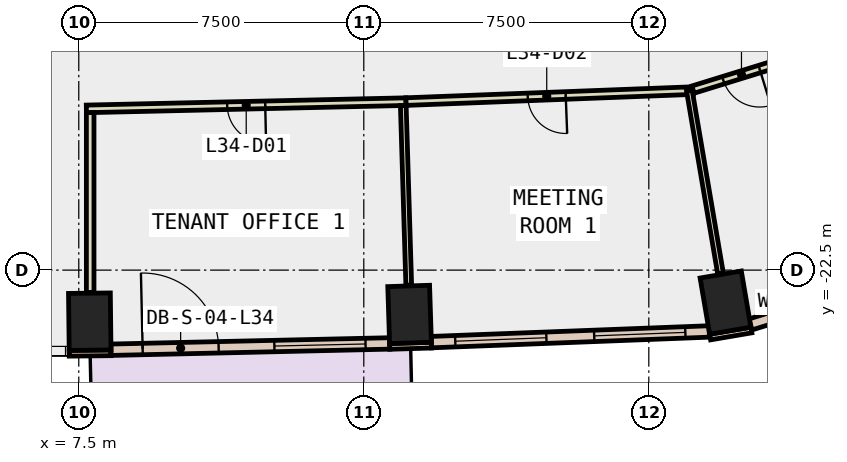
"""IFC4 building model, lengths in metres.
Left out: names, types, materials, properties, quantities, classifications, styles, units other than length and angle.
Written with IfcOpenShell. Run it as: python <this file> out.ifc"""

import sys

from ifc_helpers import new_model, si_unit, direction, frame, frame_2d, origin, origin_2d, place, context, subcontext, project, spatial, rectangle, extrude, element, fill, save


model = new_model("IFC4")
c1 = context("Model", 3, precision=1e-05, world=origin(), true_north=direction((0.0, 1.0)))
c2 = subcontext(c1, "Body", "Model", "MODEL_VIEW")
j1 = project(units=[si_unit("LENGTHUNIT", "METRE"), si_unit("PLANEANGLEUNIT", "RADIAN")], contexts=[c1])
p1 = place(None, origin())
s1 = spatial("IfcSite", under=j1, at=p1, CompositionType="ELEMENT")
p2 = place(p1, origin())
s2 = spatial("IfcBuilding", under=s1, at=p2, CompositionType="ELEMENT")
p3 = place(p2, frame((0.0, 0.0, 155.0)))
s3 = spatial("IfcBuildingStorey", under=s2, at=p3, CompositionType="ELEMENT", Elevation=155.0)
for number, where, z_axis, x_axis in (
    (1, (7.789, -23.857, -0.4), (0.0, 0.0, 1.0), (1.0, 0.012, 0.0)),
    (2, (16.205, -23.666, -0.4), (0.0, 0.0, 1.0), (0.999, 0.032, 0.0)),
    (3, (24.518, -23.355, -0.4), (0.0, 0.0, 1.0), (0.986, 0.168, 0.0)),
):
    element("IfcColumn", number, at=place(p3, frame(where, z_axis=z_axis, x_axis=x_axis)), inside=s3, PredefinedType="COLUMN", context=c2, shape_type="SweptSolid", body=[
        extrude(rectangle(XDim=1.1, YDim=1.5, at=origin_2d()), origin(), (0.0, 0.0, 1.0), 4.2),
    ])
p4 = place(p3, frame((7.249, -24.688, 0.0), z_axis=(0.0, 0.0, 1.0), x_axis=(0.999940879068, 0.010873746799, 0.0)))
e4 = element("IfcWall", 4, at=p4, inside=s3, PredefinedType="STANDARD", context=c2, shape_type="SweptSolid", body=[
    extrude(rectangle(XDim=1.1, YDim=0.15, at=frame_2d((0.55, 0.0))), origin(), (0.0, 0.0, 1.0), 3.8),
])
p5 = place(p3, frame((15.682, -24.508, 0.0), z_axis=(0.0, 0.0, 1.0), x_axis=(0.999523702549, 0.030860460829, 0.0)))
e5 = element("IfcWall", 5, at=p5, inside=s3, PredefinedType="STANDARD", context=c2, shape_type="SweptSolid", body=[
    extrude(rectangle(XDim=1.1, YDim=0.15, at=frame_2d((0.55, 0.0))), origin(), (0.0, 0.0, 1.0), 3.8),
])
p6 = place(p3, frame((24.114, -24.261, 0.0), z_axis=(0.0, 0.0, 1.0), x_axis=(0.985763338892, 0.168138751323, 0.0)))
e6 = element("IfcWall", 6, at=p6, inside=s3, PredefinedType="STANDARD", context=c2, shape_type="SweptSolid", body=[
    extrude(rectangle(XDim=1.101, YDim=0.15, at=frame_2d((0.55, 0.0))), origin(), (0.0, 0.0, 1.0), 3.8),
])
p7 = place(p3, frame((8.347, -24.595, 0.0), z_axis=(0.0, 0.0, 1.0), x_axis=(0.999743825009, 0.022633699594, 0.0)))
e7 = element("IfcWall", 7, at=p7, inside=s3, PredefinedType="STANDARD", context=c2, shape_type="SweptSolid", body=[
    extrude(rectangle(XDim=7.335, YDim=0.3, at=frame_2d((3.667, 0.0))), origin(), (0.0, 0.0, 1.0), 3.8),
])
p8 = place(p7, frame((0.834, 0.0, 0.0)))
e8 = element("IfcOpeningElement", 8, at=p8, cuts=e7, PredefinedType="OPENING", context=c2, shape_type="SweptSolid", body=[
    extrude(rectangle(XDim=2.0, YDim=2.4, at=frame_2d((1.0, 1.2))), frame((0.0, 0.16, 0.0), z_axis=(0.0, -1.0, 0.0), x_axis=(1.0, 0.0, 0.0)), (0.0, 0.0, 1.0), 0.32),
])
p9 = place(p7, frame((4.301, 0.0, 0.9)))
e9 = element("IfcOpeningElement", 9, at=p9, cuts=e7, PredefinedType="OPENING", context=c2, shape_type="SweptSolid", body=[
    extrude(rectangle(XDim=2.4, YDim=2.6, at=frame_2d((1.2, 1.3))), frame((0.0, 0.16, 0.0), z_axis=(0.0, -1.0, 0.0), x_axis=(1.0, 0.0, 0.0)), (0.0, 0.0, 1.0), 0.32),
])
p10 = place(p3, frame((16.778, -24.395, 0.0), z_axis=(0.0, 0.0, 1.0), x_axis=(0.999262356942, 0.038402369711, 0.0)))
e10 = element("IfcWall", 10, at=p10, inside=s3, PredefinedType="STANDARD", context=c2, shape_type="SweptSolid", body=[
    extrude(rectangle(XDim=7.317, YDim=0.3, at=frame_2d((3.659, 0.0))), origin(), (0.0, 0.0, 1.0), 3.8),
])
p11 = place(p10, frame((0.629, 0.0, 0.9)))
e11 = element("IfcOpeningElement", 11, at=p11, cuts=e10, PredefinedType="OPENING", context=c2, shape_type="SweptSolid", body=[
    extrude(rectangle(XDim=2.4, YDim=2.6, at=frame_2d((1.2, 1.3))), frame((0.0, 0.16, 0.0), z_axis=(0.0, -1.0, 0.0), x_axis=(1.0, 0.0, 0.0)), (0.0, 0.0, 1.0), 0.32),
])
p12 = place(p10, frame((4.288, 0.0, 0.9)))
e12 = element("IfcOpeningElement", 12, at=p12, cuts=e10, PredefinedType="OPENING", context=c2, shape_type="SweptSolid", body=[
    extrude(rectangle(XDim=2.4, YDim=2.6, at=frame_2d((1.2, 1.3))), frame((0.0, 0.16, 0.0), z_axis=(0.0, -1.0, 0.0), x_axis=(1.0, 0.0, 0.0)), (0.0, 0.0, 1.0), 0.32),
])
p13 = place(p3, frame((25.173, -23.93, 0.0), z_axis=(0.0, 0.0, 1.0), x_axis=(0.955473661147, 0.295076401723, 0.0)))
e13 = element("IfcWall", 13, at=p13, inside=s3, PredefinedType="STANDARD", context=c2, shape_type="SweptSolid", body=[
    extrude(rectangle(XDim=3.931, YDim=0.3, at=frame_2d((1.965, 0.0))), origin(), (0.0, 0.0, 1.0), 3.8),
])
p14 = place(p13, frame((1.266, 0.0, 0.9)))
e14 = element("IfcOpeningElement", 14, at=p14, cuts=e13, PredefinedType="OPENING", context=c2, shape_type="SweptSolid", body=[
    extrude(rectangle(XDim=1.4, YDim=2.6, at=frame_2d((0.7, 1.3))), frame((0.0, 0.16, 0.0), z_axis=(0.0, -1.0, 0.0), x_axis=(1.0, 0.0, 0.0)), (0.0, 0.0, 1.0), 0.32),
])
p15 = place(p3, frame((16.111, -18.067, 0.0), z_axis=(0.0, 0.0, 1.0), x_axis=(-0.999741835545, -0.022721405353, 0.0)))
e15 = element("IfcWall", 15, at=p15, inside=s3, PredefinedType="PARTITIONING", context=c2, shape_type="SweptSolid", body=[
    extrude(rectangle(XDim=8.413, YDim=0.2, at=frame_2d((4.207, 0.0))), origin(), (0.0, 0.0, 1.0), 3.8),
])
p16 = place(p15, frame((3.706, 0.0, 0.0)))
e16 = element("IfcOpeningElement", 16, at=p16, cuts=e15, PredefinedType="OPENING", context=c2, shape_type="SweptSolid", body=[
    extrude(rectangle(XDim=1.0, YDim=2.1, at=frame_2d((0.5, 1.05))), frame((0.0, 0.11, 0.0), z_axis=(0.0, -1.0, 0.0), x_axis=(1.0, 0.0, 0.0)), (0.0, 0.0, 1.0), 0.22),
])
p17 = place(p3, frame((23.667, -17.776, 0.0), z_axis=(0.0, 0.0, 1.0), x_axis=(-0.999264080977, -0.038357482575, 0.0)))
e17 = element("IfcWall", 17, at=p17, inside=s3, PredefinedType="PARTITIONING", context=c2, shape_type="SweptSolid", body=[
    extrude(rectangle(XDim=7.562, YDim=0.2, at=frame_2d((3.781, 0.0))), origin(), (0.0, 0.0, 1.0), 3.8),
])
p18 = place(p17, frame((3.356, 0.0, 0.0)))
e18 = element("IfcOpeningElement", 18, at=p18, cuts=e17, PredefinedType="OPENING", context=c2, shape_type="SweptSolid", body=[
    extrude(rectangle(XDim=1.0, YDim=2.1, at=frame_2d((0.5, 1.05))), frame((0.0, 0.11, 0.0), z_axis=(0.0, -1.0, 0.0), x_axis=(1.0, 0.0, 0.0)), (0.0, 0.0, 1.0), 0.22),
])
p19 = place(p3, frame((26.213, -16.963, 0.0), z_axis=(0.0, 0.0, 1.0), x_axis=(-0.955509582123, -0.294960062501, 0.0)))
e19 = element("IfcWall", 19, at=p19, inside=s3, PredefinedType="PARTITIONING", context=c2, shape_type="SweptSolid", body=[
    extrude(rectangle(XDim=2.668, YDim=0.2, at=frame_2d((1.334, 0.0))), origin(), (0.0, 0.0, 1.0), 3.8),
])
p20 = place(p19, frame((0.834, 0.0, 0.0)))
e20 = element("IfcOpeningElement", 20, at=p20, cuts=e19, PredefinedType="OPENING", context=c2, shape_type="SweptSolid", body=[
    extrude(rectangle(XDim=1.0, YDim=2.1, at=frame_2d((0.5, 1.05))), frame((0.0, 0.11, 0.0), z_axis=(0.0, -1.0, 0.0), x_axis=(1.0, 0.0, 0.0)), (0.0, 0.0, 1.0), 0.22),
])
p21 = place(p3, frame((7.8, -18.355, 0.0), z_axis=(0.0, 0.0, 1.0), x_axis=(0.0, -1.0, 0.0)))
e21 = element("IfcWall", 21, at=p21, inside=s3, PredefinedType="PARTITIONING", context=c2, shape_type="SweptSolid", body=[
    extrude(rectangle(XDim=4.732, YDim=0.2, at=frame_2d((2.366, 0.0))), origin(), (0.0, 0.0, 1.0), 3.8),
])
p22 = place(p3, frame((16.039, -18.169, 0.0), z_axis=(0.0, 0.0, 1.0), x_axis=(0.030457921157, -0.999536049895, 0.0)))
e22 = element("IfcWall", 22, at=p22, inside=s3, PredefinedType="PARTITIONING", context=c2, shape_type="SweptSolid", body=[
    extrude(rectangle(XDim=4.729, YDim=0.15, at=frame_2d((2.365, 0.0))), origin(), (0.0, 0.0, 1.0), 3.8),
])
p23 = place(p3, frame((23.567, -17.779, 0.0), z_axis=(0.0, 0.0, 1.0), x_axis=(0.168027663896, -0.985782280306, 0.0)))
e23 = element("IfcWall", 23, at=p23, inside=s3, PredefinedType="PARTITIONING", context=c2, shape_type="SweptSolid", body=[
    extrude(rectangle(XDim=4.886, YDim=0.15, at=frame_2d((2.443, 0.0))), origin(), (0.0, 0.0, 1.0), 3.8),
])
p24 = place(p8, origin())
e24 = element("IfcDoor", 24, at=p24, inside=s3, OperationType="SLIDING_TO_LEFT", PredefinedType="DOOR", context=c2, shape_type="SweptSolid", body=[
    extrude(rectangle(XDim=2.0, YDim=2.4, at=frame_2d((1.0, 1.2))), frame((0.0, 0.025, 0.0), z_axis=(0.0, -1.0, 0.0), x_axis=(1.0, 0.0, 0.0)), (0.0, 0.0, 1.0), 0.05),
])
fill(e8, e24)
p25 = place(p9, origin())
e25 = element("IfcWindow", 25, at=p25, inside=s3, PartitioningType="SINGLE_PANEL", PredefinedType="WINDOW", context=c2, shape_type="SweptSolid", body=[
    extrude(rectangle(XDim=2.4, YDim=2.6, at=frame_2d((1.2, 1.3))), frame((0.0, 0.03, 0.0), z_axis=(0.0, -1.0, 0.0), x_axis=(1.0, 0.0, 0.0)), (0.0, 0.0, 1.0), 0.06),
])
fill(e9, e25)
p26 = place(p11, origin())
e26 = element("IfcWindow", 26, at=p26, inside=s3, PartitioningType="SINGLE_PANEL", PredefinedType="WINDOW", context=c2, shape_type="SweptSolid", body=[
    extrude(rectangle(XDim=2.4, YDim=2.6, at=frame_2d((1.2, 1.3))), frame((0.0, 0.03, 0.0), z_axis=(0.0, -1.0, 0.0), x_axis=(1.0, 0.0, 0.0)), (0.0, 0.0, 1.0), 0.06),
])
fill(e11, e26)
p27 = place(p12, origin())
e27 = element("IfcWindow", 27, at=p27, inside=s3, PartitioningType="SINGLE_PANEL", PredefinedType="WINDOW", context=c2, shape_type="SweptSolid", body=[
    extrude(rectangle(XDim=2.4, YDim=2.6, at=frame_2d((1.2, 1.3))), frame((0.0, 0.03, 0.0), z_axis=(0.0, -1.0, 0.0), x_axis=(1.0, 0.0, 0.0)), (0.0, 0.0, 1.0), 0.06),
])
fill(e12, e27)
p28 = place(p16, origin())
e28 = element("IfcDoor", 28, at=p28, inside=s3, OperationType="SINGLE_SWING_RIGHT", PredefinedType="DOOR", context=c2, shape_type="SweptSolid", body=[
    extrude(rectangle(XDim=1.0, YDim=2.1, at=frame_2d((0.5, 1.05))), frame((0.0, 0.025, 0.0), z_axis=(0.0, -1.0, 0.0), x_axis=(1.0, 0.0, 0.0)), (0.0, 0.0, 1.0), 0.05),
])
fill(e16, e28)
p29 = place(p18, origin())
e29 = element("IfcDoor", 29, at=p29, inside=s3, OperationType="SINGLE_SWING_LEFT", PredefinedType="DOOR", context=c2, shape_type="SweptSolid", body=[
    extrude(rectangle(XDim=1.0, YDim=2.1, at=frame_2d((0.5, 1.05))), frame((0.0, 0.025, 0.0), z_axis=(0.0, -1.0, 0.0), x_axis=(1.0, 0.0, 0.0)), (0.0, 0.0, 1.0), 0.05),
])
fill(e18, e29)
p30 = place(p20, origin())
e30 = element("IfcDoor", 30, at=p30, inside=s3, OperationType="SINGLE_SWING_LEFT", PredefinedType="DOOR", context=c2, shape_type="SweptSolid", body=[
    extrude(rectangle(XDim=1.0, YDim=2.1, at=frame_2d((0.5, 1.05))), frame((0.0, 0.025, 0.0), z_axis=(0.0, -1.0, 0.0), x_axis=(1.0, 0.0, 0.0)), (0.0, 0.0, 1.0), 0.05),
])
fill(e20, e30)
save(model, sys.argv[1])
